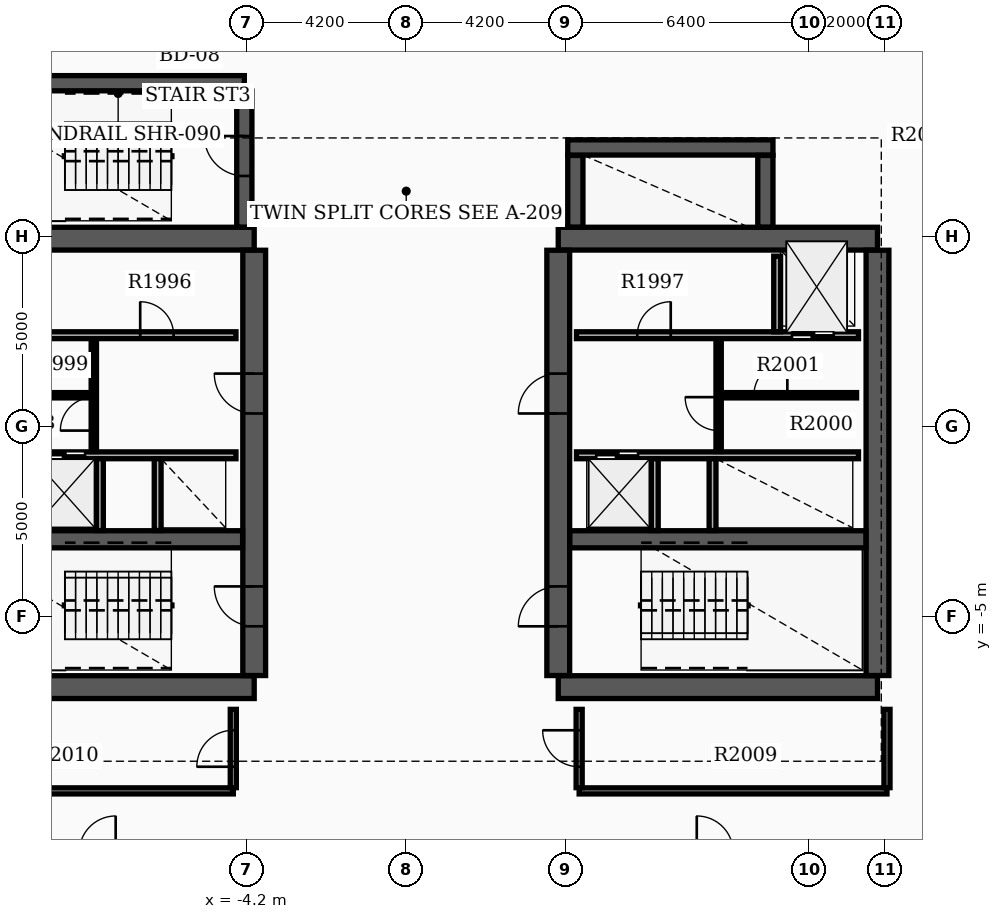
"""IFC4 building model, lengths in metres.
Left out: names, types, materials, properties, quantities, classifications, styles, units other than length and angle.
Written with IfcOpenShell. Run it as: python <this file> out.ifc"""

import sys

from ifc_helpers import new_model, si_unit, direction, frame, frame_2d, origin, place, context, subcontext, project, spatial, rectangle, extrude, element, fill, save


model = new_model("IFC4")
c1 = context("Model", 3, precision=1e-05, world=origin(), true_north=direction((0.0, 1.0)))
c2 = subcontext(c1, "Body", "Model", "MODEL_VIEW")
j1 = project(units=[si_unit("LENGTHUNIT", "METRE"), si_unit("PLANEANGLEUNIT", "RADIAN")], contexts=[c1])
p1 = place(None, origin())
s1 = spatial("IfcSite", under=j1, at=p1, CompositionType="ELEMENT")
p2 = place(p1, origin())
s2 = spatial("IfcBuilding", under=s1, at=p2, CompositionType="ELEMENT")
p3 = place(p2, frame((0.0, 0.0, 128.1)))
s3 = spatial("IfcBuildingStorey", under=s2, at=p3, CompositionType="ELEMENT", Elevation=128.1)
for number, where, z_axis, x_axis in (
    (1, (-12.4, -6.85, 0.0), (0.0, 0.0, 1.0), (1.0, 0.0, 0.0)),
    (2, (-12.4, 4.95, 0.0), (0.0, 0.0, 1.0), (1.0, 0.0, 0.0)),
):
    element("IfcWall", number, at=place(p3, frame(where, z_axis=z_axis, x_axis=x_axis)), inside=s3, PredefinedType="SHEAR", context=c2, shape_type="SweptSolid", body=[
        extrude(rectangle(XDim=8.4, YDim=0.6, at=frame_2d((4.2, 0.0))), origin(), (0.0, 0.0, 1.0), 3.7),
    ])
p4 = place(p3, frame((-4.0, -6.545, 0.0), z_axis=(0.0, 0.0, 1.0), x_axis=(0.0, 1.0, 0.0)))
e3 = element("IfcWall", 3, at=p4, inside=s3, PredefinedType="SHEAR", context=c2, shape_type="SweptSolid", body=[
    extrude(rectangle(XDim=11.19, YDim=0.6, at=frame_2d((5.595, 0.0))), origin(), (0.0, 0.0, 1.0), 3.7),
])
p5 = place(p4, frame((1.295, 0.0, 0.0)))
e4 = element("IfcOpeningElement", 4, at=p5, cuts=e3, PredefinedType="OPENING", context=c2, shape_type="SweptSolid", body=[
    extrude(rectangle(XDim=1.05, YDim=2.15, at=frame_2d((0.525, 1.075))), frame((0.0, 0.31, 0.0), z_axis=(0.0, -1.0, 0.0), x_axis=(1.0, 0.0, 0.0)), (0.0, 0.0, 1.0), 0.62),
])
p6 = place(p4, frame((6.895, 0.0, 0.0)))
e5 = element("IfcOpeningElement", 5, at=p6, cuts=e3, PredefinedType="OPENING", context=c2, shape_type="SweptSolid", body=[
    extrude(rectangle(XDim=1.05, YDim=2.15, at=frame_2d((0.525, 1.075))), frame((0.0, 0.31, 0.0), z_axis=(0.0, -1.0, 0.0), x_axis=(1.0, 0.0, 0.0)), (0.0, 0.0, 1.0), 0.62),
])
p7 = place(p3, frame((-12.095, -2.96, 0.0), z_axis=(0.0, 0.0, 1.0), x_axis=(1.0, 0.0, 0.0)))
e6 = element("IfcWall", 6, at=p7, inside=s3, PredefinedType="SHEAR", context=c2, shape_type="SweptSolid", body=[
    extrude(rectangle(XDim=7.79, YDim=0.45, at=frame_2d((3.895, 0.0))), origin(), (0.0, 0.0, 1.0), 3.7),
])
for number, where, z_axis, x_axis in (
    (7, (4.0, -6.85, 0.0), (0.0, 0.0, 1.0), (1.0, 0.0, 0.0)),
    (8, (4.0, 4.95, 0.0), (0.0, 0.0, 1.0), (1.0, 0.0, 0.0)),
):
    element("IfcWall", number, at=place(p3, frame(where, z_axis=z_axis, x_axis=x_axis)), inside=s3, PredefinedType="SHEAR", context=c2, shape_type="SweptSolid", body=[
        extrude(rectangle(XDim=8.4, YDim=0.6, at=frame_2d((4.2, 0.0))), origin(), (0.0, 0.0, 1.0), 3.7),
    ])
p8 = place(p3, frame((4.0, -6.545, 0.0), z_axis=(0.0, 0.0, 1.0), x_axis=(0.0, 1.0, 0.0)))
e9 = element("IfcWall", 9, at=p8, inside=s3, PredefinedType="SHEAR", context=c2, shape_type="SweptSolid", body=[
    extrude(rectangle(XDim=11.19, YDim=0.6, at=frame_2d((5.595, 0.0))), origin(), (0.0, 0.0, 1.0), 3.7),
])
p9 = place(p8, frame((1.295, 0.0, 0.0)))
e10 = element("IfcOpeningElement", 10, at=p9, cuts=e9, PredefinedType="OPENING", context=c2, shape_type="SweptSolid", body=[
    extrude(rectangle(XDim=1.05, YDim=2.15, at=frame_2d((0.525, 1.075))), frame((0.0, 0.31, 0.0), z_axis=(0.0, -1.0, 0.0), x_axis=(1.0, 0.0, 0.0)), (0.0, 0.0, 1.0), 0.62),
])
p10 = place(p8, frame((6.895, 0.0, 0.0)))
e11 = element("IfcOpeningElement", 11, at=p10, cuts=e9, PredefinedType="OPENING", context=c2, shape_type="SweptSolid", body=[
    extrude(rectangle(XDim=1.05, YDim=2.15, at=frame_2d((0.525, 1.075))), frame((0.0, 0.31, 0.0), z_axis=(0.0, -1.0, 0.0), x_axis=(1.0, 0.0, 0.0)), (0.0, 0.0, 1.0), 0.62),
])
p11 = place(p3, frame((12.4, -6.545, 0.0), z_axis=(0.0, 0.0, 1.0), x_axis=(0.0, 1.0, 0.0)))
e12 = element("IfcWall", 12, at=p11, inside=s3, PredefinedType="SHEAR", context=c2, shape_type="SweptSolid", body=[
    extrude(rectangle(XDim=11.19, YDim=0.6, at=frame_2d((5.595, 0.0))), origin(), (0.0, 0.0, 1.0), 3.7),
])
p12 = place(p3, frame((4.305, -2.96, 0.0), z_axis=(0.0, 0.0, 1.0), x_axis=(1.0, 0.0, 0.0)))
e13 = element("IfcWall", 13, at=p12, inside=s3, PredefinedType="SHEAR", context=c2, shape_type="SweptSolid", body=[
    extrude(rectangle(XDim=7.79, YDim=0.45, at=frame_2d((3.895, 0.0))), origin(), (0.0, 0.0, 1.0), 3.7),
])
p13 = place(p3, frame((-12.22, 9.04, 0.0), z_axis=(0.0, 0.0, 1.0), x_axis=(1.0, 0.0, 0.0)))
e14 = element("IfcWall", 14, at=p13, inside=s3, PredefinedType="SHEAR", context=c2, shape_type="SweptSolid", body=[
    extrude(rectangle(XDim=7.96, YDim=0.4, at=frame_2d((3.98, 0.0))), origin(), (0.0, 0.0, 1.0), 3.7),
])
p14 = place(p3, frame((-4.26, 5.255, 0.0), z_axis=(0.0, 0.0, 1.0), x_axis=(0.0, 1.0, 0.0)))
e15 = element("IfcWall", 15, at=p14, inside=s3, PredefinedType="SHEAR", context=c2, shape_type="SweptSolid", body=[
    extrude(rectangle(XDim=3.58, YDim=0.4, at=frame_2d((1.79, 0.0))), origin(), (0.0, 0.0, 1.0), 3.7),
])
p15 = place(p14, frame((1.345, 0.0, 0.0)))
e16 = element("IfcOpeningElement", 16, at=p15, cuts=e15, PredefinedType="OPENING", context=c2, shape_type="SweptSolid", body=[
    extrude(rectangle(XDim=1.05, YDim=2.15, at=frame_2d((0.525, 1.075))), frame((0.0, 0.21, 0.0), z_axis=(0.0, -1.0, 0.0), x_axis=(1.0, 0.0, 0.0)), (0.0, 0.0, 1.0), 0.42),
])
p16 = place(p3, frame((4.45, 5.255, 0.0), z_axis=(0.0, 0.0, 1.0), x_axis=(0.0, 1.0, 0.0)))
e17 = element("IfcWall", 17, at=p16, inside=s3, PredefinedType="SHEAR", context=c2, shape_type="SweptSolid", body=[
    extrude(rectangle(XDim=1.885, YDim=0.4, at=frame_2d((0.942, 0.0))), origin(), (0.0, 0.0, 1.0), 3.7),
])
p17 = place(p3, frame((4.25, 7.35, 0.0), z_axis=(0.0, 0.0, 1.0), x_axis=(1.0, 0.0, 0.0)))
e18 = element("IfcWall", 18, at=p17, inside=s3, PredefinedType="SHEAR", context=c2, shape_type="SweptSolid", body=[
    extrude(rectangle(XDim=5.4, YDim=0.4, at=frame_2d((2.7, 0.0))), origin(), (0.0, 0.0, 1.0), 3.7),
])
p18 = place(p3, frame((9.45, 5.255, 0.0), z_axis=(0.0, 0.0, 1.0), x_axis=(0.0, 1.0, 0.0)))
e19 = element("IfcWall", 19, at=p18, inside=s3, PredefinedType="SHEAR", context=c2, shape_type="SweptSolid", body=[
    extrude(rectangle(XDim=1.885, YDim=0.4, at=frame_2d((0.942, 0.0))), origin(), (0.0, 0.0, 1.0), 3.7),
])
p19 = place(p3, frame((-11.9, 2.41, 0.0), z_axis=(0.0, 0.0, 1.0), x_axis=(1.0, 0.0, 0.0)))
e20 = element("IfcWall", 20, at=p19, inside=s3, PredefinedType="SOLIDWALL", context=c2, shape_type="SweptSolid", body=[
    extrude(rectangle(XDim=7.42, YDim=0.18, at=frame_2d((3.71, 0.0))), origin(), (0.0, 0.0, 1.0), 2.96),
])
p20 = place(p19, frame((0.55, 0.0, 0.0)))
e21 = element("IfcOpeningElement", 21, at=p20, cuts=e20, PredefinedType="OPENING", context=c2, shape_type="SweptSolid", body=[
    extrude(rectangle(XDim=1.1, YDim=2.15, at=frame_2d((0.55, 1.075))), frame((0.0, 0.1, 0.0), z_axis=(0.0, -1.0, 0.0), x_axis=(1.0, 0.0, 0.0)), (0.0, 0.0, 1.0), 0.2),
])
p21 = place(p19, frame((4.9, 0.0, 0.0)))
e22 = element("IfcOpeningElement", 22, at=p21, cuts=e20, PredefinedType="OPENING", context=c2, shape_type="SweptSolid", body=[
    extrude(rectangle(XDim=0.88, YDim=2.1, at=frame_2d((0.44, 1.05))), frame((0.0, 0.1, 0.0), z_axis=(0.0, -1.0, 0.0), x_axis=(1.0, 0.0, 0.0)), (0.0, 0.0, 1.0), 0.2),
])
p22 = place(p3, frame((4.48, 2.41, 0.0), z_axis=(0.0, 0.0, 1.0), x_axis=(1.0, 0.0, 0.0)))
e23 = element("IfcWall", 23, at=p22, inside=s3, PredefinedType="SOLIDWALL", context=c2, shape_type="SweptSolid", body=[
    extrude(rectangle(XDim=7.42, YDim=0.18, at=frame_2d((3.71, 0.0))), origin(), (0.0, 0.0, 1.0), 2.96),
])
p23 = place(p22, frame((5.67, 0.0, 0.0)))
e24 = element("IfcOpeningElement", 24, at=p23, cuts=e23, PredefinedType="OPENING", context=c2, shape_type="SweptSolid", body=[
    extrude(rectangle(XDim=1.1, YDim=2.15, at=frame_2d((0.55, 1.075))), frame((0.0, 0.1, 0.0), z_axis=(0.0, -1.0, 0.0), x_axis=(1.0, 0.0, 0.0)), (0.0, 0.0, 1.0), 0.2),
])
p24 = place(p22, frame((1.6, 0.0, 0.0)))
e25 = element("IfcOpeningElement", 25, at=p24, cuts=e23, PredefinedType="OPENING", context=c2, shape_type="SweptSolid", body=[
    extrude(rectangle(XDim=0.88, YDim=2.1, at=frame_2d((0.44, 1.05))), frame((0.0, 0.1, 0.0), z_axis=(0.0, -1.0, 0.0), x_axis=(1.0, 0.0, 0.0)), (0.0, 0.0, 1.0), 0.2),
])
p25 = place(p3, frame((-11.9, -0.75, 0.0), z_axis=(0.0, 0.0, 1.0), x_axis=(1.0, 0.0, 0.0)))
e26 = element("IfcWall", 26, at=p25, inside=s3, PredefinedType="SOLIDWALL", context=c2, shape_type="SweptSolid", body=[
    extrude(rectangle(XDim=7.42, YDim=0.18, at=frame_2d((3.71, 0.0))), origin(), (0.0, 0.0, 1.0), 2.96),
])
p26 = place(p25, frame((0.45, 0.0, 0.0)))
e27 = element("IfcOpeningElement", 27, at=p26, cuts=e26, PredefinedType="OPENING", context=c2, shape_type="SweptSolid", body=[
    extrude(rectangle(XDim=1.1, YDim=2.15, at=frame_2d((0.55, 1.075))), frame((0.0, 0.1, 0.0), z_axis=(0.0, -1.0, 0.0), x_axis=(1.0, 0.0, 0.0)), (0.0, 0.0, 1.0), 0.2),
])
p27 = place(p25, frame((2.35, 0.0, 0.0)))
e28 = element("IfcOpeningElement", 28, at=p27, cuts=e26, PredefinedType="OPENING", context=c2, shape_type="SweptSolid", body=[
    extrude(rectangle(XDim=1.1, YDim=2.15, at=frame_2d((0.55, 1.075))), frame((0.0, 0.1, 0.0), z_axis=(0.0, -1.0, 0.0), x_axis=(1.0, 0.0, 0.0)), (0.0, 0.0, 1.0), 0.2),
])
p28 = place(p3, frame((4.48, -0.75, 0.0), z_axis=(0.0, 0.0, 1.0), x_axis=(1.0, 0.0, 0.0)))
e29 = element("IfcWall", 29, at=p28, inside=s3, PredefinedType="SOLIDWALL", context=c2, shape_type="SweptSolid", body=[
    extrude(rectangle(XDim=7.42, YDim=0.18, at=frame_2d((3.71, 0.0))), origin(), (0.0, 0.0, 1.0), 2.96),
])
p29 = place(p28, frame((0.52, 0.0, 0.0)))
e30 = element("IfcOpeningElement", 30, at=p29, cuts=e29, PredefinedType="OPENING", context=c2, shape_type="SweptSolid", body=[
    extrude(rectangle(XDim=1.1, YDim=2.15, at=frame_2d((0.55, 1.075))), frame((0.0, 0.1, 0.0), z_axis=(0.0, -1.0, 0.0), x_axis=(1.0, 0.0, 0.0)), (0.0, 0.0, 1.0), 0.2),
])
p30 = place(p3, frame((9.76, 2.5, 0.0), z_axis=(0.0, 0.0, 1.0), x_axis=(0.0, 1.0, 0.0)))
e31 = element("IfcWall", 31, at=p30, inside=s3, PredefinedType="SOLIDWALL", context=c2, shape_type="SweptSolid", body=[
    extrude(rectangle(XDim=1.99, YDim=0.18, at=frame_2d((0.995, 0.0))), origin(), (0.0, 0.0, 1.0), 2.96),
])
for number, where, z_axis, x_axis in (
    (32, (-8.06, -2.73, 0.0), (0.0, 0.0, 1.0), (0.0, 1.0, 0.0)),
    (33, (-6.54, -2.73, 0.0), (0.0, 0.0, 1.0), (0.0, 1.0, 0.0)),
    (34, (6.54, -2.73, 0.0), (0.0, 0.0, 1.0), (0.0, 1.0, 0.0)),
    (35, (8.06, -2.73, 0.0), (0.0, 0.0, 1.0), (0.0, 1.0, 0.0)),
):
    element("IfcWall", number, at=place(p3, frame(where, z_axis=z_axis, x_axis=x_axis)), inside=s3, PredefinedType="SOLIDWALL", context=c2, shape_type="SweptSolid", body=[
        extrude(rectangle(XDim=1.89, YDim=0.18, at=frame_2d((0.945, 0.0))), origin(), (0.0, 0.0, 1.0), 2.96),
    ])
p31 = place(p3, frame((-8.22, -0.65, 0.0), z_axis=(0.0, 0.0, 1.0), x_axis=(0.0, 1.0, 0.0)))
e36 = element("IfcWall", 36, at=p31, inside=s3, PredefinedType="SOLIDWALL", context=c2, shape_type="SweptSolid", body=[
    extrude(rectangle(XDim=2.96, YDim=0.14, at=frame_2d((1.48, 0.0))), origin(), (0.0, 0.0, 1.0), 2.96),
])
p32 = place(p31, frame((0.55, 0.0, 0.0)))
e37 = element("IfcOpeningElement", 37, at=p32, cuts=e36, PredefinedType="OPENING", context=c2, shape_type="SweptSolid", body=[
    extrude(rectangle(XDim=0.88, YDim=2.1, at=frame_2d((0.44, 1.05))), frame((0.0, 0.08, 0.0), z_axis=(0.0, -1.0, 0.0), x_axis=(1.0, 0.0, 0.0)), (0.0, 0.0, 1.0), 0.16),
])
p33 = place(p3, frame((8.22, -0.65, 0.0), z_axis=(0.0, 0.0, 1.0), x_axis=(0.0, 1.0, 0.0)))
e38 = element("IfcWall", 38, at=p33, inside=s3, PredefinedType="SOLIDWALL", context=c2, shape_type="SweptSolid", body=[
    extrude(rectangle(XDim=2.96, YDim=0.14, at=frame_2d((1.48, 0.0))), origin(), (0.0, 0.0, 1.0), 2.96),
])
p34 = place(p33, frame((0.55, 0.0, 0.0)))
e39 = element("IfcOpeningElement", 39, at=p34, cuts=e38, PredefinedType="OPENING", context=c2, shape_type="SweptSolid", body=[
    extrude(rectangle(XDim=0.88, YDim=2.1, at=frame_2d((0.44, 1.05))), frame((0.0, 0.08, 0.0), z_axis=(0.0, -1.0, 0.0), x_axis=(1.0, 0.0, 0.0)), (0.0, 0.0, 1.0), 0.16),
])
p35 = place(p3, frame((-11.85, 0.83, 0.0), z_axis=(0.0, 0.0, 1.0), x_axis=(1.0, 0.0, 0.0)))
e40 = element("IfcWall", 40, at=p35, inside=s3, PredefinedType="PARTITIONING", context=c2, shape_type="SweptSolid", body=[
    extrude(rectangle(XDim=3.552, YDim=0.14, at=frame_2d((1.776, 0.0))), origin(), (0.0, 0.0, 1.0), 2.96),
])
p36 = place(p35, frame((0.85, 0.0, 0.0)))
e41 = element("IfcOpeningElement", 41, at=p36, cuts=e40, PredefinedType="OPENING", context=c2, shape_type="SweptSolid", body=[
    extrude(rectangle(XDim=0.88, YDim=2.1, at=frame_2d((0.44, 1.05))), frame((0.0, 0.08, 0.0), z_axis=(0.0, -1.0, 0.0), x_axis=(1.0, 0.0, 0.0)), (0.0, 0.0, 1.0), 0.16),
])
p37 = place(p3, frame((8.298, 0.83, 0.0), z_axis=(0.0, 0.0, 1.0), x_axis=(1.0, 0.0, 0.0)))
e42 = element("IfcWall", 42, at=p37, inside=s3, PredefinedType="PARTITIONING", context=c2, shape_type="SweptSolid", body=[
    extrude(rectangle(XDim=3.552, YDim=0.14, at=frame_2d((1.776, 0.0))), origin(), (0.0, 0.0, 1.0), 2.96),
])
p38 = place(p37, frame((0.85, 0.0, 0.0)))
e43 = element("IfcOpeningElement", 43, at=p38, cuts=e42, PredefinedType="OPENING", context=c2, shape_type="SweptSolid", body=[
    extrude(rectangle(XDim=0.88, YDim=2.1, at=frame_2d((0.44, 1.05))), frame((0.0, 0.08, 0.0), z_axis=(0.0, -1.0, 0.0), x_axis=(1.0, 0.0, 0.0)), (0.0, 0.0, 1.0), 0.16),
])
p39 = place(p3, frame((4.55, -9.58, 0.0), z_axis=(0.0, 0.0, 1.0), x_axis=(1.0, 0.0, 0.0)))
e44 = element("IfcWall", 44, at=p39, inside=s3, PredefinedType="PARTITIONING", context=c2, shape_type="SweptSolid", body=[
    extrude(rectangle(XDim=8.1, YDim=0.16, at=frame_2d((4.05, 0.0))), origin(), (0.0, 0.0, 1.0), 2.96),
])
p40 = place(p3, frame((4.55, -9.495, 0.0), z_axis=(0.0, 0.0, 1.0), x_axis=(0.0, 1.0, 0.0)))
e45 = element("IfcWall", 45, at=p40, inside=s3, PredefinedType="PARTITIONING", context=c2, shape_type="SweptSolid", body=[
    extrude(rectangle(XDim=2.06, YDim=0.16, at=frame_2d((1.03, 0.0))), origin(), (0.0, 0.0, 1.0), 2.96),
])
p41 = place(p40, frame((0.55, 0.0, 0.0)))
e46 = element("IfcOpeningElement", 46, at=p41, cuts=e45, PredefinedType="OPENING", context=c2, shape_type="SweptSolid", body=[
    extrude(rectangle(XDim=0.96, YDim=2.15, at=frame_2d((0.48, 1.075))), frame((0.0, 0.09, 0.0), z_axis=(0.0, -1.0, 0.0), x_axis=(1.0, 0.0, 0.0)), (0.0, 0.0, 1.0), 0.18),
])
p42 = place(p3, frame((12.65, -9.495, 0.0), z_axis=(0.0, 0.0, 1.0), x_axis=(0.0, 1.0, 0.0)))
e47 = element("IfcWall", 47, at=p42, inside=s3, PredefinedType="PARTITIONING", context=c2, shape_type="SweptSolid", body=[
    extrude(rectangle(XDim=2.06, YDim=0.16, at=frame_2d((1.03, 0.0))), origin(), (0.0, 0.0, 1.0), 2.96),
])
p43 = place(p3, frame((-12.65, -9.58, 0.0), z_axis=(0.0, 0.0, 1.0), x_axis=(1.0, 0.0, 0.0)))
e48 = element("IfcWall", 48, at=p43, inside=s3, PredefinedType="PARTITIONING", context=c2, shape_type="SweptSolid", body=[
    extrude(rectangle(XDim=8.1, YDim=0.16, at=frame_2d((4.05, 0.0))), origin(), (0.0, 0.0, 1.0), 2.96),
])
p44 = place(p3, frame((-4.55, -9.495, 0.0), z_axis=(0.0, 0.0, 1.0), x_axis=(0.0, 1.0, 0.0)))
e49 = element("IfcWall", 49, at=p44, inside=s3, PredefinedType="PARTITIONING", context=c2, shape_type="SweptSolid", body=[
    extrude(rectangle(XDim=2.06, YDim=0.16, at=frame_2d((1.03, 0.0))), origin(), (0.0, 0.0, 1.0), 2.96),
])
p45 = place(p44, frame((0.55, 0.0, 0.0)))
e50 = element("IfcOpeningElement", 50, at=p45, cuts=e49, PredefinedType="OPENING", context=c2, shape_type="SweptSolid", body=[
    extrude(rectangle(XDim=0.96, YDim=2.15, at=frame_2d((0.48, 1.075))), frame((0.0, 0.09, 0.0), z_axis=(0.0, -1.0, 0.0), x_axis=(1.0, 0.0, 0.0)), (0.0, 0.0, 1.0), 0.18),
])
p46 = place(p5, origin())
e51 = element("IfcDoor", 51, at=p46, inside=s3, OperationType="SINGLE_SWING_RIGHT", PredefinedType="DOOR", context=c2, shape_type="SweptSolid", body=[
    extrude(rectangle(XDim=1.05, YDim=2.15, at=frame_2d((0.525, 1.075))), frame((0.0, 0.025, 0.0), z_axis=(0.0, -1.0, 0.0), x_axis=(1.0, 0.0, 0.0)), (0.0, 0.0, 1.0), 0.05),
])
fill(e4, e51)
p47 = place(p9, origin())
e52 = element("IfcDoor", 52, at=p47, inside=s3, OperationType="SINGLE_SWING_LEFT", PredefinedType="DOOR", context=c2, shape_type="SweptSolid", body=[
    extrude(rectangle(XDim=1.05, YDim=2.15, at=frame_2d((0.525, 1.075))), frame((0.0, 0.025, 0.0), z_axis=(0.0, -1.0, 0.0), x_axis=(1.0, 0.0, 0.0)), (0.0, 0.0, 1.0), 0.05),
])
fill(e10, e52)
p48 = place(p6, origin())
e53 = element("IfcDoor", 53, at=p48, inside=s3, OperationType="SINGLE_SWING_RIGHT", PredefinedType="DOOR", context=c2, shape_type="SweptSolid", body=[
    extrude(rectangle(XDim=1.05, YDim=2.15, at=frame_2d((0.525, 1.075))), frame((0.0, 0.025, 0.0), z_axis=(0.0, -1.0, 0.0), x_axis=(1.0, 0.0, 0.0)), (0.0, 0.0, 1.0), 0.05),
])
fill(e5, e53)
p49 = place(p10, origin())
e54 = element("IfcDoor", 54, at=p49, inside=s3, OperationType="SINGLE_SWING_LEFT", PredefinedType="DOOR", context=c2, shape_type="SweptSolid", body=[
    extrude(rectangle(XDim=1.05, YDim=2.15, at=frame_2d((0.525, 1.075))), frame((0.0, 0.025, 0.0), z_axis=(0.0, -1.0, 0.0), x_axis=(1.0, 0.0, 0.0)), (0.0, 0.0, 1.0), 0.05),
])
fill(e11, e54)
p50 = place(p15, origin())
e55 = element("IfcDoor", 55, at=p50, inside=s3, OperationType="SINGLE_SWING_RIGHT", PredefinedType="DOOR", context=c2, shape_type="SweptSolid", body=[
    extrude(rectangle(XDim=1.05, YDim=2.15, at=frame_2d((0.525, 1.075))), frame((0.0, 0.025, 0.0), z_axis=(0.0, -1.0, 0.0), x_axis=(1.0, 0.0, 0.0)), (0.0, 0.0, 1.0), 0.05),
])
fill(e16, e55)
p51 = place(p23, origin())
e56 = element("IfcDoor", 56, at=p51, inside=s3, OperationType="DOUBLE_DOOR_SLIDING", PredefinedType="DOOR", context=c2, shape_type="SweptSolid", body=[
    extrude(rectangle(XDim=1.1, YDim=2.15, at=frame_2d((0.55, 1.075))), frame((0.0, 0.025, 0.0), z_axis=(0.0, -1.0, 0.0), x_axis=(1.0, 0.0, 0.0)), (0.0, 0.0, 1.0), 0.05),
])
fill(e24, e56)
p52 = place(p27, origin())
e57 = element("IfcDoor", 57, at=p52, inside=s3, OperationType="DOUBLE_DOOR_SLIDING", PredefinedType="DOOR", context=c2, shape_type="SweptSolid", body=[
    extrude(rectangle(XDim=1.1, YDim=2.15, at=frame_2d((0.55, 1.075))), frame((0.0, 0.025, 0.0), z_axis=(0.0, -1.0, 0.0), x_axis=(1.0, 0.0, 0.0)), (0.0, 0.0, 1.0), 0.05),
])
fill(e28, e57)
p53 = place(p29, origin())
e58 = element("IfcDoor", 58, at=p53, inside=s3, OperationType="DOUBLE_DOOR_SLIDING", PredefinedType="DOOR", context=c2, shape_type="SweptSolid", body=[
    extrude(rectangle(XDim=1.1, YDim=2.15, at=frame_2d((0.55, 1.075))), frame((0.0, 0.025, 0.0), z_axis=(0.0, -1.0, 0.0), x_axis=(1.0, 0.0, 0.0)), (0.0, 0.0, 1.0), 0.05),
])
fill(e30, e58)
p54 = place(p21, origin())
e59 = element("IfcDoor", 59, at=p54, inside=s3, OperationType="SINGLE_SWING_LEFT", PredefinedType="DOOR", context=c2, shape_type="SweptSolid", body=[
    extrude(rectangle(XDim=0.88, YDim=2.1, at=frame_2d((0.44, 1.05))), frame((0.0, 0.025, 0.0), z_axis=(0.0, -1.0, 0.0), x_axis=(1.0, 0.0, 0.0)), (0.0, 0.0, 1.0), 0.05),
])
fill(e22, e59)
p55 = place(p24, origin())
e60 = element("IfcDoor", 60, at=p55, inside=s3, OperationType="SINGLE_SWING_RIGHT", PredefinedType="DOOR", context=c2, shape_type="SweptSolid", body=[
    extrude(rectangle(XDim=0.88, YDim=2.1, at=frame_2d((0.44, 1.05))), frame((0.0, 0.025, 0.0), z_axis=(0.0, -1.0, 0.0), x_axis=(1.0, 0.0, 0.0)), (0.0, 0.0, 1.0), 0.05),
])
fill(e25, e60)
p56 = place(p32, origin())
e61 = element("IfcDoor", 61, at=p56, inside=s3, OperationType="SINGLE_SWING_LEFT", PredefinedType="DOOR", context=c2, shape_type="SweptSolid", body=[
    extrude(rectangle(XDim=0.88, YDim=2.1, at=frame_2d((0.44, 1.05))), frame((0.0, 0.025, 0.0), z_axis=(0.0, -1.0, 0.0), x_axis=(1.0, 0.0, 0.0)), (0.0, 0.0, 1.0), 0.05),
])
fill(e37, e61)
p57 = place(p34, origin())
e62 = element("IfcDoor", 62, at=p57, inside=s3, OperationType="SINGLE_SWING_RIGHT", PredefinedType="DOOR", context=c2, shape_type="SweptSolid", body=[
    extrude(rectangle(XDim=0.88, YDim=2.1, at=frame_2d((0.44, 1.05))), frame((0.0, 0.025, 0.0), z_axis=(0.0, -1.0, 0.0), x_axis=(1.0, 0.0, 0.0)), (0.0, 0.0, 1.0), 0.05),
])
fill(e39, e62)
p58 = place(p38, origin())
e63 = element("IfcDoor", 63, at=p58, inside=s3, OperationType="SINGLE_SWING_RIGHT", PredefinedType="DOOR", context=c2, shape_type="SweptSolid", body=[
    extrude(rectangle(XDim=0.88, YDim=2.1, at=frame_2d((0.44, 1.05))), frame((0.0, 0.025, 0.0), z_axis=(0.0, -1.0, 0.0), x_axis=(1.0, 0.0, 0.0)), (0.0, 0.0, 1.0), 0.05),
])
fill(e43, e63)
p59 = place(p41, origin())
e64 = element("IfcDoor", 64, at=p59, inside=s3, OperationType="SINGLE_SWING_RIGHT", PredefinedType="DOOR", context=c2, shape_type="SweptSolid", body=[
    extrude(rectangle(XDim=0.96, YDim=2.15, at=frame_2d((0.48, 1.075))), frame((0.0, 0.025, 0.0), z_axis=(0.0, -1.0, 0.0), x_axis=(1.0, 0.0, 0.0)), (0.0, 0.0, 1.0), 0.05),
])
fill(e46, e64)
p60 = place(p45, origin())
e65 = element("IfcDoor", 65, at=p60, inside=s3, OperationType="SINGLE_SWING_LEFT", PredefinedType="DOOR", context=c2, shape_type="SweptSolid", body=[
    extrude(rectangle(XDim=0.96, YDim=2.15, at=frame_2d((0.48, 1.075))), frame((0.0, 0.025, 0.0), z_axis=(0.0, -1.0, 0.0), x_axis=(1.0, 0.0, 0.0)), (0.0, 0.0, 1.0), 0.05),
])
fill(e50, e65)
save(model, sys.argv[1])
